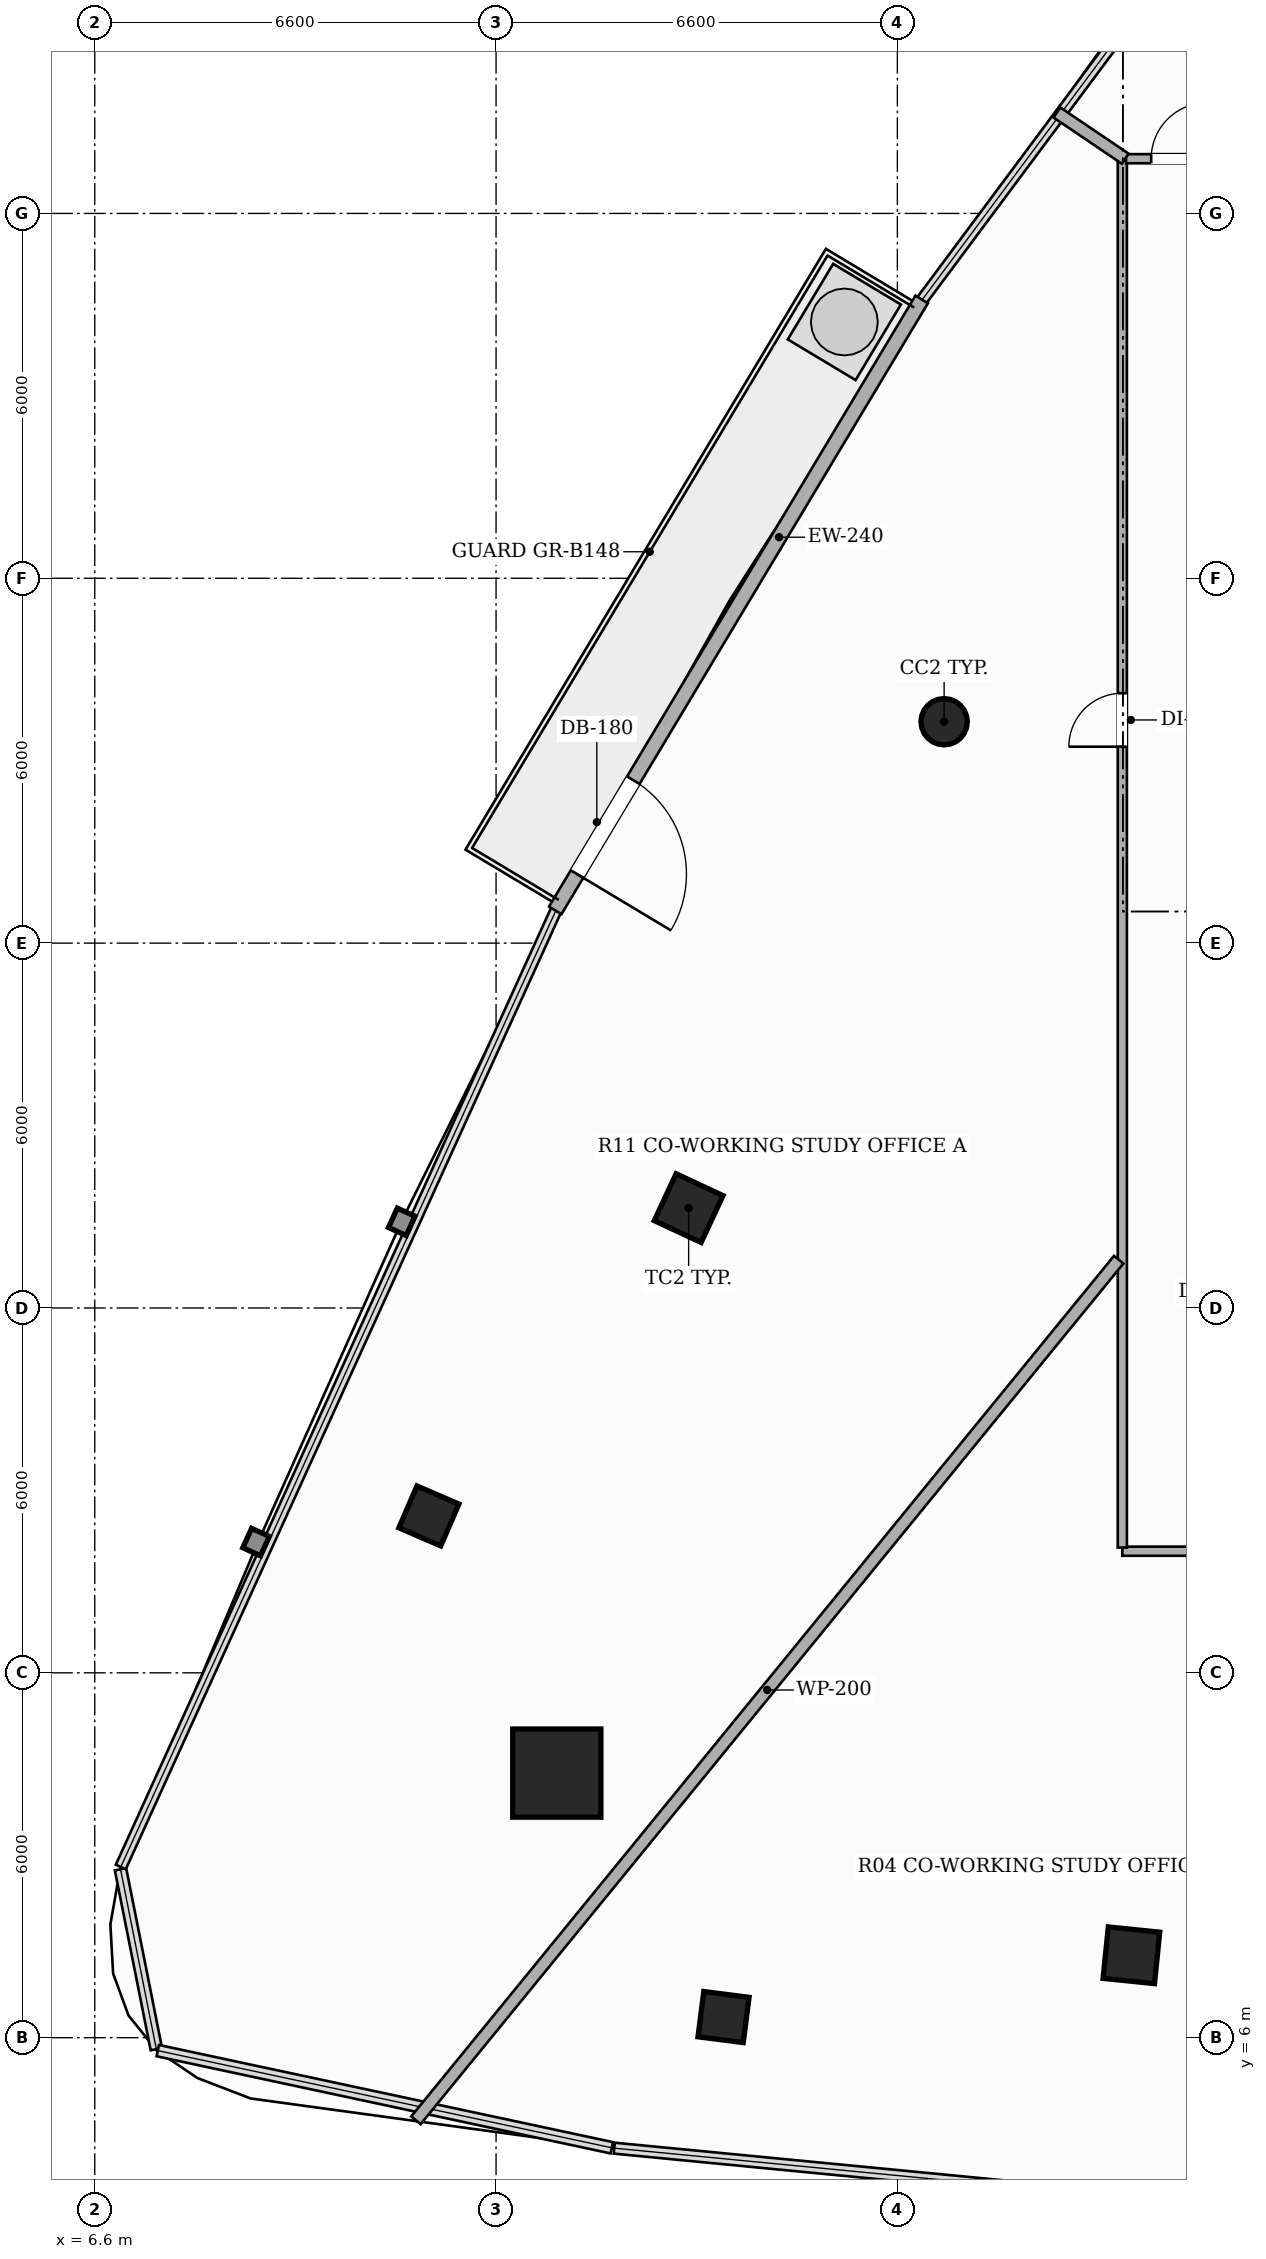
"""IFC4 building model, lengths in metres.
Left out: names, types, materials, properties, quantities, classifications, styles, units other than length and angle.
Written with IfcOpenShell. Run it as: python <this file> out.ifc"""

import sys

from ifc_helpers import new_model, si_unit, direction, frame, frame_2d, origin, origin_2d, place, context, subcontext, project, spatial, rectangle, hollow_rectangle, hollow_circle, extrude, element, fill, save


model = new_model("IFC4")
c1 = context("Model", 3, precision=1e-05, world=origin(), true_north=direction((0.0, 1.0)))
c2 = subcontext(c1, "Body", "Model", "MODEL_VIEW")
j1 = project(units=[si_unit("LENGTHUNIT", "METRE"), si_unit("PLANEANGLEUNIT", "RADIAN")], contexts=[c1])
p1 = place(None, origin())
s1 = spatial("IfcSite", under=j1, at=p1, CompositionType="ELEMENT")
p2 = place(p1, origin())
s2 = spatial("IfcBuilding", under=s1, at=p2, CompositionType="ELEMENT")
p3 = place(p2, frame((0.0, 0.0, 116.6)))
s3 = spatial("IfcBuildingStorey", under=s2, at=p3, CompositionType="ELEMENT", Elevation=116.6)
p4 = place(p3, frame((14.199, 10.351, 0.0), z_axis=(0.0, 0.0, 1.0), x_axis=(1.0, 0.0, 0.0)))
e1 = element("IfcColumn", 1, at=p4, inside=s3, PredefinedType="COLUMN", context=c2, shape_type="SweptSolid", body=[
    extrude(hollow_rectangle(XDim=1.45, YDim=1.45, WallThickness=0.045, at=origin_2d()), origin(), (0.0, 0.0, 1.0), 3.3),
])
p5 = place(p3, frame((20.569, 27.641, 0.0), z_axis=(0.0, 0.0, 1.0), x_axis=(1.0, 0.0, 0.0)))
e2 = element("IfcColumn", 2, at=p5, inside=s3, PredefinedType="COLUMN", context=c2, shape_type="SweptSolid", body=[
    extrude(hollow_circle(Radius=0.381, WallThickness=0.022, at=origin_2d()), origin(), (0.0, 0.0, 1.0), 3.3),
])
for number, where, z_axis, x_axis in (
    (3, (16.367, 19.642, 0.0), (0.0, 0.0, 1.0), (0.423, 0.906, 0.0)),
    (4, (23.649, 7.355, 0.0), (0.0, 0.0, 1.0), (-0.995, 0.101, 0.0)),
):
    element("IfcColumn", number, at=place(p3, frame(where, z_axis=z_axis, x_axis=x_axis)), inside=s3, PredefinedType="COLUMN", context=c2, shape_type="SweptSolid", body=[
        extrude(hollow_rectangle(XDim=0.85, YDim=0.85, WallThickness=0.028, at=origin_2d()), origin(), (0.0, 0.0, 1.0), 3.3),
    ])
for number, where, z_axis, x_axis in (
    (5, (12.095, 14.58, 0.0), (0.0, 0.0, 1.0), (0.397, 0.918, 0.0)),
    (6, (16.941, 6.339, 0.0), (0.0, 0.0, 1.0), (-0.992, 0.127, 0.0)),
):
    element("IfcColumn", number, at=place(p3, frame(where, z_axis=z_axis, x_axis=x_axis)), inside=s3, PredefinedType="COLUMN", context=c2, shape_type="SweptSolid", body=[
        extrude(hollow_rectangle(XDim=0.75, YDim=0.75, WallThickness=0.025, at=origin_2d()), origin(), (0.0, 0.0, 1.0), 3.3),
    ])
p6 = place(p3, frame((20.2, 34.586, 0.0), z_axis=(0.0, 0.0, 1.0), x_axis=(-0.514379309275, -0.857562782652, 0.0)))
e7 = element("IfcWall", 7, at=p6, inside=s3, PredefinedType="SOLIDWALL", context=c2, shape_type="SweptSolid", body=[
    extrude(rectangle(XDim=11.717, YDim=0.24, at=frame_2d((5.858, 0.0))), origin(), (0.0, 0.0, 1.0), 2.624),
])
p7 = place(p6, frame((9.22, 0.0, 0.0)))
e8 = element("IfcOpeningElement", 8, at=p7, cuts=e7, PredefinedType="OPENING", context=c2, shape_type="SweptSolid", body=[
    extrude(rectangle(XDim=1.8, YDim=2.2, at=frame_2d((0.9, 1.1))), frame((0.0, 0.13, 0.0), z_axis=(0.0, -1.0, 0.0), x_axis=(1.0, 0.0, 0.0)), (0.0, 0.0, 1.0), 0.26),
])
p8 = place(p3, frame((26.09, 14.0, 0.0), z_axis=(0.0, 0.0, 1.0), x_axis=(-1.0, 0.0, 0.0)))
e9 = element("IfcWall", 9, at=p8, inside=s3, PredefinedType="PARTITIONING", context=c2, shape_type="SweptSolid", body=[
    extrude(rectangle(XDim=2.59, YDim=0.15, at=frame_2d((1.295, 0.0))), origin(), (0.0, 0.0, 1.0), 2.721),
])
p9 = place(p3, frame((23.5, 14.06, 0.0), z_axis=(0.0, 0.0, 1.0), x_axis=(0.0, 1.0, 0.0)))
e10 = element("IfcWall", 10, at=p9, inside=s3, PredefinedType="PARTITIONING", context=c2, shape_type="SweptSolid", body=[
    extrude(rectangle(XDim=22.84, YDim=0.15, at=frame_2d((11.42, 0.0))), origin(), (0.0, 0.0, 1.0), 2.413),
])
p10 = place(p9, frame((13.17, 0.0, 0.0)))
e11 = element("IfcOpeningElement", 11, at=p10, cuts=e10, PredefinedType="OPENING", context=c2, shape_type="SweptSolid", body=[
    extrude(rectangle(XDim=0.88, YDim=2.1, at=frame_2d((0.44, 1.05))), frame((0.0, 0.085, 0.0), z_axis=(0.0, -1.0, 0.0), x_axis=(1.0, 0.0, 0.0)), (0.0, 0.0, 1.0), 0.17),
])
p11 = place(p3, frame((23.56, 36.9, 0.0), z_axis=(0.0, 0.0, 1.0), x_axis=(1.0, 0.0, 0.0)))
e12 = element("IfcWall", 12, at=p11, inside=s3, PredefinedType="PARTITIONING", context=c2, shape_type="SweptSolid", body=[
    extrude(rectangle(XDim=2.59, YDim=0.15, at=frame_2d((1.295, 0.0))), origin(), (0.0, 0.0, 1.0), 2.413),
])
p12 = place(p11, frame((0.414, 0.0, 0.0)))
e13 = element("IfcOpeningElement", 13, at=p12, cuts=e12, PredefinedType="OPENING", context=c2, shape_type="SweptSolid", body=[
    extrude(rectangle(XDim=0.92, YDim=2.15, at=frame_2d((0.46, 1.075))), frame((0.0, 0.085, 0.0), z_axis=(0.0, -1.0, 0.0), x_axis=(1.0, 0.0, 0.0)), (0.0, 0.0, 1.0), 0.17),
])
p13 = place(p3, frame((23.44, 18.794, 0.0), z_axis=(0.0, 0.0, 1.0), x_axis=(-0.632525219644, -0.774539764321, 0.0)))
e14 = element("IfcWall", 14, at=p13, inside=s3, PredefinedType="PARTITIONING", context=c2, shape_type="SweptSolid", body=[
    extrude(rectangle(XDim=18.272, YDim=0.2, at=frame_2d((9.136, 0.0))), origin(), (0.0, 0.0, 1.0), 2.413),
])
p14 = place(p3, frame((22.424, 37.66, 0.0), z_axis=(0.0, 0.0, 1.0), x_axis=(0.82818018374, -0.560461937388, 0.0)))
e15 = element("IfcWall", 15, at=p14, inside=s3, PredefinedType="PARTITIONING", context=c2, shape_type="SweptSolid", body=[
    extrude(rectangle(XDim=1.356, YDim=0.2, at=frame_2d((0.678, 0.0))), origin(), (0.0, 0.0, 1.0), 3.06),
])
p15 = place(p7, origin())
e16 = element("IfcDoor", 16, at=p15, inside=s3, OperationType="SINGLE_SWING_RIGHT", PredefinedType="DOOR", context=c2, shape_type="SweptSolid", body=[
    extrude(rectangle(XDim=1.8, YDim=2.2, at=frame_2d((0.9, 1.1))), frame((0.0, 0.025, 0.0), z_axis=(0.0, -1.0, 0.0), x_axis=(1.0, 0.0, 0.0)), (0.0, 0.0, 1.0), 0.05),
])
fill(e8, e16)
p16 = place(p10, origin())
e17 = element("IfcDoor", 17, at=p16, inside=s3, OperationType="SINGLE_SWING_LEFT", PredefinedType="DOOR", context=c2, shape_type="SweptSolid", body=[
    extrude(rectangle(XDim=0.88, YDim=2.1, at=frame_2d((0.44, 1.05))), frame((0.0, 0.025, 0.0), z_axis=(0.0, -1.0, 0.0), x_axis=(1.0, 0.0, 0.0)), (0.0, 0.0, 1.0), 0.05),
])
fill(e11, e17)
p17 = place(p12, origin())
e18 = element("IfcDoor", 18, at=p17, inside=s3, OperationType="SINGLE_SWING_RIGHT", PredefinedType="DOOR", context=c2, shape_type="SweptSolid", body=[
    extrude(rectangle(XDim=0.92, YDim=2.15, at=frame_2d((0.46, 1.075))), frame((0.0, 0.025, 0.0), z_axis=(0.0, -1.0, 0.0), x_axis=(1.0, 0.0, 0.0)), (0.0, 0.0, 1.0), 0.05),
])
fill(e13, e18)
save(model, sys.argv[1])
